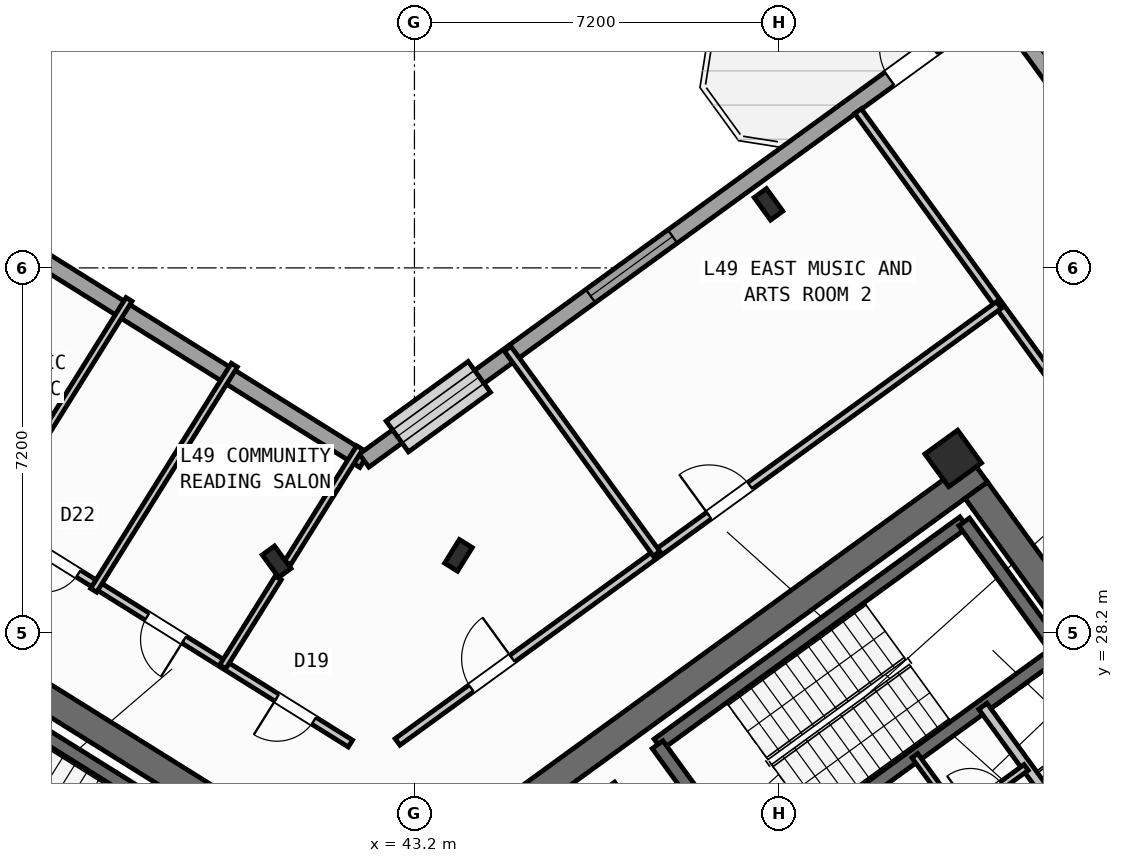
"""IFC4 building model, lengths in metres.
Left out: names, types, materials, properties, quantities, classifications, styles, units other than length and angle.
Written with IfcOpenShell. Run it as: python <this file> out.ifc"""

import sys

from ifc_helpers import new_model, si_unit, direction, frame, frame_2d, origin, origin_2d, place, context, subcontext, project, spatial, rectangle, hollow_rectangle, i_section, extrude, source, transform, mapped, element, fill, save


model = new_model("IFC4")
c1 = context("Model", 3, precision=1e-05, world=origin(), true_north=direction((0.0, 1.0)))
c2 = subcontext(c1, "Body", "Model", "MODEL_VIEW")
j1 = project(units=[si_unit("LENGTHUNIT", "METRE"), si_unit("PLANEANGLEUNIT", "RADIAN")], contexts=[c1])
p1 = place(None, origin())
s1 = spatial("IfcSite", under=j1, at=p1, CompositionType="ELEMENT")
p2 = place(p1, origin())
s2 = spatial("IfcBuilding", under=s1, at=p2, CompositionType="ELEMENT")
p3 = place(p2, frame((0.0, 0.0, 195.0)))
s3 = spatial("IfcBuildingStorey", under=s2, at=p3, CompositionType="ELEMENT", Elevation=195.0)
p4 = place(p3, frame((40.573, 24.01, 0.0), z_axis=(0.0, 0.0, 1.0), x_axis=(-0.848047359947, 0.529920442413, 0.0)))
e1 = element("IfcWall", 1, at=p4, inside=s3, PredefinedType="SHEAR", context=c2, shape_type="SweptSolid", body=[
    extrude(rectangle(XDim=13.14, YDim=0.55, at=frame_2d((6.57, 0.0))), origin(), (0.0, 0.0, 1.0), 4.22),
])
p5 = place(p3, frame((44.365, 24.142, 0.0), z_axis=(0.0, 0.0, 1.0), x_axis=(0.809024304885, 0.587775190107, 0.0)))
e2 = element("IfcWall", 2, at=p5, inside=s3, PredefinedType="SHEAR", context=c2, shape_type="SweptSolid", body=[
    extrude(rectangle(XDim=12.34, YDim=0.55, at=frame_2d((6.17, 0.0))), origin(), (0.0, 0.0, 1.0), 4.22),
])
p6 = place(p3, frame((58.064, 25.813, 0.0), z_axis=(0.0, 0.0, 1.0), x_axis=(-0.587764933797, 0.809031756236, 0.0)))
e3 = element("IfcWall", 3, at=p6, inside=s3, PredefinedType="SHEAR", context=c2, shape_type="SweptSolid", body=[
    extrude(rectangle(XDim=6.425, YDim=0.55, at=frame_2d((3.212, 0.0))), origin(), (0.0, 0.0, 1.0), 4.22),
])
m1 = source(origin(), c2, "Body", "SweptSolid", [
    extrude(i_section(OverallWidth=0.3, OverallDepth=0.55, WebThickness=0.015, FlangeThickness=0.029, at=origin_2d()), origin(), (0.0, 0.0, 1.0), 4.5),
])
for number, where, z_axis, x_axis in (
    (4, (44.068, 29.726, 0.0), (0.0, 0.0, 1.0), (-0.848, 0.53, 0.0)),
    (5, (40.479, 29.601, 0.0), (0.0, 0.0, 1.0), (0.809, 0.588, 0.0)),
):
    element("IfcColumn", number, at=place(p3, frame(where, z_axis=z_axis, x_axis=x_axis)), inside=s3, PredefinedType="COLUMN", context=c2, shape_type="MappedRepresentation", body=[
        mapped(m1, transform((0.0, 0.0, 0.0), scale=1.0)),
    ])
m2 = source(origin(), c2, "Body", "SweptSolid", [
    extrude(hollow_rectangle(XDim=0.8, YDim=0.8, WallThickness=0.032, at=origin_2d()), origin(), (0.0, 0.0, 1.0), 4.5),
])
p7 = place(p3, frame((53.832, 31.638, 0.0), z_axis=(0.0, 0.0, 1.0), x_axis=(0.809016994375, 0.587785252292, 0.0)))
e6 = element("IfcColumn", 6, at=p7, inside=s3, PredefinedType="COLUMN", context=c2, shape_type="MappedRepresentation", body=[
    mapped(m2, transform((0.0, 0.0, 0.0), scale=1.0)),
])
p8 = place(p3, frame((50.188, 36.654, 0.0), z_axis=(0.0, 0.0, 1.0), x_axis=(0.809016994375, 0.587785252292, 0.0)))
e7 = element("IfcColumn", 7, at=p8, inside=s3, PredefinedType="COLUMN", context=c2, shape_type="MappedRepresentation", body=[
    mapped(m1, transform((0.0, 0.0, 0.0), scale=1.0)),
])
p9 = place(p3, frame((17.424, 47.083, 0.0), z_axis=(0.0, 0.0, 1.0), x_axis=(0.848049927979, -0.529916332693, 0.0)))
e8 = element("IfcWall", 8, at=p9, inside=s3, PredefinedType="STANDARD", context=c2, shape_type="SweptSolid", body=[
    extrude(rectangle(XDim=29.223, YDim=0.32, at=frame_2d((14.612, 0.0))), origin(), (0.0, 0.0, 1.0), 4.22),
])
p10 = place(p9, frame((2.752, 0.0, 0.0)))
e9 = element("IfcOpeningElement", 9, at=p10, cuts=e8, PredefinedType="OPENING", context=c2, shape_type="SweptSolid", body=[
    extrude(rectangle(XDim=1.05, YDim=2.15, at=frame_2d((0.525, 1.075))), frame((0.0, 0.17, 0.0), z_axis=(0.0, -1.0, 0.0), x_axis=(1.0, 0.0, 0.0)), (0.0, 0.0, 1.0), 0.34),
])
p11 = place(p9, frame((0.641, 0.0, 0.85)))
e10 = element("IfcOpeningElement", 10, at=p11, cuts=e8, PredefinedType="OPENING", context=c2, shape_type="SweptSolid", body=[
    extrude(rectangle(XDim=1.6, YDim=1.8, at=frame_2d((0.8, 0.9))), frame((0.0, 0.17, 0.0), z_axis=(0.0, -1.0, 0.0), x_axis=(1.0, 0.0, 0.0)), (0.0, 0.0, 1.0), 0.34),
])
p12 = place(p9, frame((9.876, 0.0, 0.75)))
e11 = element("IfcOpeningElement", 11, at=p12, cuts=e8, PredefinedType="OPENING", context=c2, shape_type="SweptSolid", body=[
    extrude(rectangle(XDim=2.0, YDim=1.95, at=frame_2d((1.0, 0.975))), frame((0.0, 0.17, 0.0), z_axis=(0.0, -1.0, 0.0), x_axis=(1.0, 0.0, 0.0)), (0.0, 0.0, 1.0), 0.34),
])
p13 = place(p9, frame((13.674, 0.0, 0.85)))
e12 = element("IfcOpeningElement", 12, at=p13, cuts=e8, PredefinedType="OPENING", context=c2, shape_type="SweptSolid", body=[
    extrude(rectangle(XDim=1.6, YDim=1.8, at=frame_2d((0.8, 0.9))), frame((0.0, 0.17, 0.0), z_axis=(0.0, -1.0, 0.0), x_axis=(1.0, 0.0, 0.0)), (0.0, 0.0, 1.0), 0.34),
])
p14 = place(p3, frame((42.207, 31.597, 0.0), z_axis=(0.0, 0.0, 1.0), x_axis=(0.809020333377, 0.587780656523, 0.0)))
e13 = element("IfcWall", 13, at=p14, inside=s3, PredefinedType="STANDARD", context=c2, shape_type="SweptSolid", body=[
    extrude(rectangle(XDim=15.223, YDim=0.32, at=frame_2d((7.611, 0.0))), origin(), (0.0, 0.0, 1.0), 4.22),
])
p15 = place(p14, frame((12.82, 0.0, 0.0)))
e14 = element("IfcOpeningElement", 14, at=p15, cuts=e13, PredefinedType="OPENING", context=c2, shape_type="SweptSolid", body=[
    extrude(rectangle(XDim=1.05, YDim=2.15, at=frame_2d((0.525, 1.075))), frame((0.0, 0.17, 0.0), z_axis=(0.0, -1.0, 0.0), x_axis=(1.0, 0.0, 0.0)), (0.0, 0.0, 1.0), 0.34),
])
p16 = place(p14, frame((0.81, 0.0, 0.75)))
e15 = element("IfcOpeningElement", 15, at=p16, cuts=e13, PredefinedType="OPENING", context=c2, shape_type="SweptSolid", body=[
    extrude(rectangle(XDim=2.0, YDim=1.95, at=frame_2d((1.0, 0.975))), frame((0.0, 0.17, 0.0), z_axis=(0.0, -1.0, 0.0), x_axis=(1.0, 0.0, 0.0)), (0.0, 0.0, 1.0), 0.34),
])
p17 = place(p14, frame((5.524, 0.0, 0.75)))
e16 = element("IfcOpeningElement", 16, at=p17, cuts=e13, PredefinedType="OPENING", context=c2, shape_type="SweptSolid", body=[
    extrude(rectangle(XDim=2.0, YDim=1.95, at=frame_2d((1.0, 0.975))), frame((0.0, 0.17, 0.0), z_axis=(0.0, -1.0, 0.0), x_axis=(1.0, 0.0, 0.0)), (0.0, 0.0, 1.0), 0.34),
])
p18 = place(p3, frame((54.81, 40.5, 0.0), z_axis=(0.0, 0.0, 1.0), x_axis=(0.587783625747, -0.809018176127, 0.0)))
e17 = element("IfcWall", 17, at=p18, inside=s3, PredefinedType="STANDARD", context=c2, shape_type="SweptSolid", body=[
    extrude(rectangle(XDim=21.587, YDim=0.32, at=frame_2d((10.794, 0.0))), origin(), (0.0, 0.0, 1.0), 3.695),
])
p19 = place(p18, frame((2.131, 0.0, 0.7)))
e18 = element("IfcOpeningElement", 18, at=p19, cuts=e17, PredefinedType="OPENING", context=c2, shape_type="SweptSolid", body=[
    extrude(rectangle(XDim=2.6, YDim=2.0, at=frame_2d((1.3, 1.0))), frame((0.0, 0.17, 0.0), z_axis=(0.0, -1.0, 0.0), x_axis=(1.0, 0.0, 0.0)), (0.0, 0.0, 1.0), 0.34),
])
p20 = place(p18, frame((9.244, 0.0, 0.75)))
e19 = element("IfcOpeningElement", 19, at=p20, cuts=e17, PredefinedType="OPENING", context=c2, shape_type="SweptSolid", body=[
    extrude(rectangle(XDim=2.0, YDim=1.95, at=frame_2d((1.0, 0.975))), frame((0.0, 0.17, 0.0), z_axis=(0.0, -1.0, 0.0), x_axis=(1.0, 0.0, 0.0)), (0.0, 0.0, 1.0), 0.34),
])
p21 = place(p18, frame((15.294, 0.0, 0.85)))
e20 = element("IfcOpeningElement", 20, at=p21, cuts=e17, PredefinedType="OPENING", context=c2, shape_type="SweptSolid", body=[
    extrude(rectangle(XDim=1.6, YDim=1.8, at=frame_2d((0.8, 0.9))), frame((0.0, 0.17, 0.0), z_axis=(0.0, -1.0, 0.0), x_axis=(1.0, 0.0, 0.0)), (0.0, 0.0, 1.0), 0.34),
])
p22 = place(p18, frame((18.194, 0.0, 0.85)))
e21 = element("IfcOpeningElement", 21, at=p22, cuts=e17, PredefinedType="OPENING", context=c2, shape_type="SweptSolid", body=[
    extrude(rectangle(XDim=1.6, YDim=1.8, at=frame_2d((0.8, 0.9))), frame((0.0, 0.17, 0.0), z_axis=(0.0, -1.0, 0.0), x_axis=(1.0, 0.0, 0.0)), (0.0, 0.0, 1.0), 0.34),
])
p23 = place(p3, frame((39.721, 23.788, 0.0), z_axis=(0.0, 0.0, 1.0), x_axis=(-0.848054434086, 0.529909121291, 0.0)))
e22 = element("IfcWall", 22, at=p23, inside=s3, PredefinedType="SHEAR", context=c2, shape_type="SweptSolid", body=[
    extrude(rectangle(XDim=7.33, YDim=0.26, at=frame_2d((3.665, 0.0))), origin(), (0.0, 0.0, 1.0), 4.22),
])
p24 = place(p3, frame((48.006, 25.996, 0.0), z_axis=(0.0, 0.0, 1.0), x_axis=(0.80901903764, 0.587782439969, 0.0)))
e23 = element("IfcWall", 23, at=p24, inside=s3, PredefinedType="SHEAR", context=c2, shape_type="SweptSolid", body=[
    extrude(rectangle(XDim=7.46, YDim=0.26, at=frame_2d((3.73, 0.0))), origin(), (0.0, 0.0, 1.0), 4.22),
])
p25 = place(p3, frame((49.863, 23.44, 0.0), z_axis=(0.0, 0.0, 1.0), x_axis=(0.809003474932, 0.587803859759, 0.0)))
e24 = element("IfcWall", 24, at=p25, inside=s3, PredefinedType="SHEAR", context=c2, shape_type="SweptSolid", body=[
    extrude(rectangle(XDim=7.46, YDim=0.26, at=frame_2d((3.73, 0.0))), origin(), (0.0, 0.0, 1.0), 4.22),
])
p26 = place(p25, frame((0.36, 0.0, 0.0)))
e25 = element("IfcOpeningElement", 25, at=p26, cuts=e24, PredefinedType="OPENING", context=c2, shape_type="SweptSolid", body=[
    extrude(rectangle(XDim=0.86, YDim=2.05, at=frame_2d((0.43, 1.025))), frame((0.0, 0.14, 0.0), z_axis=(0.0, -1.0, 0.0), x_axis=(1.0, 0.0, 0.0)), (0.0, 0.0, 1.0), 0.28),
])
p27 = place(p3, frame((49.855, 23.434, 0.0), z_axis=(0.0, 0.0, 1.0), x_axis=(-0.58776738483, 0.809029975545, 0.0)))
e26 = element("IfcWall", 26, at=p27, inside=s3, PredefinedType="SHEAR", context=c2, shape_type="SweptSolid", body=[
    extrude(rectangle(XDim=3.16, YDim=0.26, at=frame_2d((1.58, 0.0))), origin(), (0.0, 0.0, 1.0), 4.22),
])
p28 = place(p3, frame((55.906, 27.831, 0.0), z_axis=(0.0, 0.0, 1.0), x_axis=(-0.587804123638, 0.809003283204, 0.0)))
e27 = element("IfcWall", 27, at=p28, inside=s3, PredefinedType="SHEAR", context=c2, shape_type="SweptSolid", body=[
    extrude(rectangle(XDim=3.16, YDim=0.26, at=frame_2d((1.58, 0.0))), origin(), (0.0, 0.0, 1.0), 4.22),
])
p29 = place(p3, frame((48.786, 22.83, 0.0), z_axis=(0.0, 0.0, 1.0), x_axis=(-0.587783856777, 0.809018008275, 0.0)))
e28 = element("IfcWall", 28, at=p29, inside=s3, PredefinedType="STANDARD", context=c2, shape_type="SweptSolid", body=[
    extrude(rectangle(XDim=2.92, YDim=0.2, at=frame_2d((1.46, 0.0))), origin(), (0.0, 0.0, 1.0), 4.21),
])
p30 = place(p3, frame((56.111, 24.419, 0.0), z_axis=(0.0, 0.0, 1.0), x_axis=(-0.58777848983, 0.809021907548, 0.0)))
e29 = element("IfcWall", 29, at=p30, inside=s3, PredefinedType="STANDARD", context=c2, shape_type="SweptSolid", body=[
    extrude(rectangle(XDim=2.88, YDim=0.2, at=frame_2d((1.44, 0.0))), origin(), (0.0, 0.0, 1.0), 4.21),
])
p31 = place(p3, frame((53.425, 22.468, 0.0), z_axis=(0.0, 0.0, 1.0), x_axis=(0.809024377198, 0.587775090574, 0.0)))
e30 = element("IfcWall", 30, at=p31, inside=s3, PredefinedType="STANDARD", context=c2, shape_type="SweptSolid", body=[
    extrude(rectangle(XDim=5.418, YDim=0.2, at=frame_2d((2.709, 0.0))), origin(), (0.0, 0.0, 1.0), 4.21),
])
p32 = place(p31, frame((4.28, 0.0, 0.0)))
e31 = element("IfcOpeningElement", 31, at=p32, cuts=e30, PredefinedType="OPENING", context=c2, shape_type="SweptSolid", body=[
    extrude(rectangle(XDim=0.86, YDim=2.05, at=frame_2d((0.43, 1.025))), frame((0.0, 0.11, 0.0), z_axis=(0.0, -1.0, 0.0), x_axis=(1.0, 0.0, 0.0)), (0.0, 0.0, 1.0), 0.22),
])
p33 = place(p31, frame((0.35, 0.0, 0.0)))
e32 = element("IfcOpeningElement", 32, at=p33, cuts=e30, PredefinedType="OPENING", context=c2, shape_type="SweptSolid", body=[
    extrude(rectangle(XDim=0.86, YDim=2.05, at=frame_2d((0.43, 1.025))), frame((0.0, 0.11, 0.0), z_axis=(0.0, -1.0, 0.0), x_axis=(1.0, 0.0, 0.0)), (0.0, 0.0, 1.0), 0.22),
])
p34 = place(p3, frame((53.945, 24.576, 0.0), z_axis=(0.0, 0.0, 1.0), x_axis=(-0.587897037186, 0.808935766095, 0.0)))
e33 = element("IfcWall", 33, at=p34, inside=s3, PredefinedType="PLUMBINGWALL", context=c2, shape_type="SweptSolid", body=[
    extrude(rectangle(XDim=1.48, YDim=0.14, at=frame_2d((0.74, 0.0))), origin(), (0.0, 0.0, 1.0), 4.21),
])
p35 = place(p3, frame((52.618, 23.612, 0.0), z_axis=(0.0, 0.0, 1.0), x_axis=(0.809009587469, 0.587795446889, 0.0)))
e34 = element("IfcWall", 34, at=p35, inside=s3, PredefinedType="PLUMBINGWALL", context=c2, shape_type="SweptSolid", body=[
    extrude(rectangle(XDim=3.28, YDim=0.14, at=frame_2d((1.64, 0.0))), origin(), (0.0, 0.0, 1.0), 4.21),
])
p36 = place(p35, frame((0.25, 0.0, 0.0)))
e35 = element("IfcOpeningElement", 35, at=p36, cuts=e34, PredefinedType="OPENING", context=c2, shape_type="SweptSolid", body=[
    extrude(rectangle(XDim=0.78, YDim=2.05, at=frame_2d((0.39, 1.025))), frame((0.0, 0.08, 0.0), z_axis=(0.0, -1.0, 0.0), x_axis=(1.0, 0.0, 0.0)), (0.0, 0.0, 1.0), 0.16),
])
p37 = place(p35, frame((1.92, 0.0, 0.0)))
e36 = element("IfcOpeningElement", 36, at=p37, cuts=e34, PredefinedType="OPENING", context=c2, shape_type="SweptSolid", body=[
    extrude(rectangle(XDim=0.78, YDim=2.05, at=frame_2d((0.39, 1.025))), frame((0.0, 0.08, 0.0), z_axis=(0.0, -1.0, 0.0), x_axis=(1.0, 0.0, 0.0)), (0.0, 0.0, 1.0), 0.16),
])
p38 = place(p3, frame((41.936, 26.012, 0.0), z_axis=(0.0, 0.0, 1.0), x_axis=(-0.848051154596, 0.529914369676, 0.0)))
e37 = element("IfcWall", 37, at=p38, inside=s3, PredefinedType="PARTITIONING", context=c2, shape_type="SweptSolid", body=[
    extrude(rectangle(XDim=15.57, YDim=0.16, at=frame_2d((7.785, 0.0))), origin(), (0.0, 0.0, 1.0), 4.21),
])
p39 = place(p38, frame((0.85, 0.0, 0.0)))
e38 = element("IfcOpeningElement", 38, at=p39, cuts=e37, PredefinedType="OPENING", context=c2, shape_type="SweptSolid", body=[
    extrude(rectangle(XDim=0.86, YDim=2.05, at=frame_2d((0.43, 1.025))), frame((0.0, 0.09, 0.0), z_axis=(0.0, -1.0, 0.0), x_axis=(1.0, 0.0, 0.0)), (0.0, 0.0, 1.0), 0.18),
])
p40 = place(p38, frame((3.87, 0.0, 0.0)))
e39 = element("IfcOpeningElement", 39, at=p40, cuts=e37, PredefinedType="OPENING", context=c2, shape_type="SweptSolid", body=[
    extrude(rectangle(XDim=0.86, YDim=2.05, at=frame_2d((0.43, 1.025))), frame((0.0, 0.09, 0.0), z_axis=(0.0, -1.0, 0.0), x_axis=(1.0, 0.0, 0.0)), (0.0, 0.0, 1.0), 0.18),
])
p41 = place(p38, frame((6.33, 0.0, 0.0)))
e40 = element("IfcOpeningElement", 40, at=p41, cuts=e37, PredefinedType="OPENING", context=c2, shape_type="SweptSolid", body=[
    extrude(rectangle(XDim=0.78, YDim=2.05, at=frame_2d((0.39, 1.025))), frame((0.0, 0.09, 0.0), z_axis=(0.0, -1.0, 0.0), x_axis=(1.0, 0.0, 0.0)), (0.0, 0.0, 1.0), 0.18),
])
p42 = place(p38, frame((8.78, 0.0, 0.0)))
e41 = element("IfcOpeningElement", 41, at=p42, cuts=e37, PredefinedType="OPENING", context=c2, shape_type="SweptSolid", body=[
    extrude(rectangle(XDim=0.78, YDim=2.05, at=frame_2d((0.39, 1.025))), frame((0.0, 0.09, 0.0), z_axis=(0.0, -1.0, 0.0), x_axis=(1.0, 0.0, 0.0)), (0.0, 0.0, 1.0), 0.18),
])
p43 = place(p38, frame((11.18, 0.0, 0.0)))
e42 = element("IfcOpeningElement", 42, at=p43, cuts=e37, PredefinedType="OPENING", context=c2, shape_type="SweptSolid", body=[
    extrude(rectangle(XDim=0.78, YDim=2.05, at=frame_2d((0.39, 1.025))), frame((0.0, 0.09, 0.0), z_axis=(0.0, -1.0, 0.0), x_axis=(1.0, 0.0, 0.0)), (0.0, 0.0, 1.0), 0.18),
])
p44 = place(p3, frame((42.119, 31.853, 0.0), z_axis=(0.0, 0.0, 1.0), x_axis=(-0.529933506458, -0.848039196461, 0.0)))
e43 = element("IfcWall", 43, at=p44, inside=s3, PredefinedType="PLUMBINGWALL", context=c2, shape_type="SweptSolid", body=[
    extrude(rectangle(XDim=2.683, YDim=0.14, at=frame_2d((1.342, 0.0))), origin(), (0.0, 0.0, 1.0), 3.805),
])
p45 = place(p3, frame((40.512, 29.281, 0.0), z_axis=(0.0, 0.0, 1.0), x_axis=(-0.529935255849, -0.848038103276, 0.0)))
e44 = element("IfcWall", 44, at=p45, inside=s3, PredefinedType="PLUMBINGWALL", context=c2, shape_type="SweptSolid", body=[
    extrude(rectangle(XDim=2.068, YDim=0.14, at=frame_2d((1.034, 0.0))), origin(), (0.0, 0.0, 1.0), 4.21),
])
for number, where, z_axis, x_axis in (
    (45, (39.646, 33.48, 0.0), (0.0, 0.0, 1.0), (-0.53, -0.848, 0.0)),
    (46, (37.568, 34.779, 0.0), (0.0, 0.0, 1.0), (-0.53, -0.848, 0.0)),
):
    element("IfcWall", number, at=place(p3, frame(where, z_axis=z_axis, x_axis=x_axis)), inside=s3, PredefinedType="PLUMBINGWALL", context=c2, shape_type="SweptSolid", body=[
        extrude(rectangle(XDim=5.24, YDim=0.14, at=frame_2d((2.62, 0.0))), origin(), (0.0, 0.0, 1.0), 4.21),
    ])
p46 = place(p3, frame((64.709, 20.938, 0.0), z_axis=(0.0, 0.0, 1.0), x_axis=(-0.58777828151, 0.809022058899, 0.0)))
e47 = element("IfcWall", 47, at=p46, inside=s3, PredefinedType="PARTITIONING", context=c2, shape_type="SweptSolid", body=[
    extrude(rectangle(XDim=21.7, YDim=0.16, at=frame_2d((10.85, 0.0))), origin(), (0.0, 0.0, 1.0), 4.21),
])
p47 = place(p46, frame((5.12, 0.0, 0.0)))
e48 = element("IfcOpeningElement", 48, at=p47, cuts=e47, PredefinedType="OPENING", context=c2, shape_type="SweptSolid", body=[
    extrude(rectangle(XDim=1.7, YDim=2.2, at=frame_2d((0.85, 1.1))), frame((0.0, 0.09, 0.0), z_axis=(0.0, -1.0, 0.0), x_axis=(1.0, 0.0, 0.0)), (0.0, 0.0, 1.0), 0.18),
])
p48 = place(p3, frame((42.866, 26.044, 0.0), z_axis=(0.0, 0.0, 1.0), x_axis=(0.809020254154, 0.587780765566, 0.0)))
e49 = element("IfcWall", 49, at=p48, inside=s3, PredefinedType="PARTITIONING", context=c2, shape_type="SweptSolid", body=[
    extrude(rectangle(XDim=14.67, YDim=0.16, at=frame_2d((7.335, 0.0))), origin(), (0.0, 0.0, 1.0), 4.21),
])
p49 = place(p48, frame((1.8, 0.0, 0.0)))
e50 = element("IfcOpeningElement", 50, at=p49, cuts=e49, PredefinedType="OPENING", context=c2, shape_type="SweptSolid", body=[
    extrude(rectangle(XDim=1.0, YDim=2.1, at=frame_2d((0.5, 1.05))), frame((0.0, 0.09, 0.0), z_axis=(0.0, -1.0, 0.0), x_axis=(1.0, 0.0, 0.0)), (0.0, 0.0, 1.0), 0.18),
])
p50 = place(p48, frame((7.6, 0.0, 0.0)))
e51 = element("IfcOpeningElement", 51, at=p50, cuts=e49, PredefinedType="OPENING", context=c2, shape_type="SweptSolid", body=[
    extrude(rectangle(XDim=1.0, YDim=2.1, at=frame_2d((0.5, 1.05))), frame((0.0, 0.09, 0.0), z_axis=(0.0, -1.0, 0.0), x_axis=(1.0, 0.0, 0.0)), (0.0, 0.0, 1.0), 0.18),
])
p51 = place(p3, frame((47.979, 29.759, 0.0), z_axis=(0.0, 0.0, 1.0), x_axis=(-0.587782595105, 0.809018924928, 0.0)))
e52 = element("IfcWall", 52, at=p51, inside=s3, PredefinedType="PARTITIONING", context=c2, shape_type="SweptSolid", body=[
    extrude(rectangle(XDim=5.0, YDim=0.16, at=frame_2d((2.5, 0.0))), origin(), (0.0, 0.0, 1.0), 4.21),
])
m3 = source(origin(), c2, "Body", "SweptSolid", [
    extrude(rectangle(XDim=1.05, YDim=2.15, at=frame_2d((0.525, 1.075))), frame((0.0, 0.025, 0.0), z_axis=(0.0, -1.0, 0.0), x_axis=(1.0, 0.0, 0.0)), (0.0, 0.0, 1.0), 0.05),
])
p52 = place(p15, origin())
e53 = element("IfcDoor", 53, at=p52, inside=s3, OperationType="SINGLE_SWING_RIGHT", PredefinedType="DOOR", context=c2, shape_type="MappedRepresentation", body=[
    mapped(m3, transform((0.0, 0.0, 0.0), scale=1.0)),
])
fill(e14, e53)
m4 = source(origin(), c2, "Body", "SweptSolid", [
    extrude(rectangle(XDim=2.0, YDim=1.95, at=frame_2d((1.0, 0.975))), frame((0.0, 0.03, 0.0), z_axis=(0.0, -1.0, 0.0), x_axis=(1.0, 0.0, 0.0)), (0.0, 0.0, 1.0), 0.06),
])
p53 = place(p16, origin())
e54 = element("IfcWindow", 54, at=p53, inside=s3, PartitioningType="SINGLE_PANEL", PredefinedType="WINDOW", context=c2, shape_type="MappedRepresentation", body=[
    mapped(m4, transform((0.0, 0.0, 0.0), scale=1.0)),
])
fill(e15, e54)
p54 = place(p17, origin())
e55 = element("IfcWindow", 55, at=p54, inside=s3, PartitioningType="SINGLE_PANEL", PredefinedType="WINDOW", context=c2, shape_type="MappedRepresentation", body=[
    mapped(m4, transform((0.0, 0.0, 0.0), scale=1.0)),
])
fill(e16, e55)
m5 = source(origin(), c2, "Body", "SweptSolid", [
    extrude(rectangle(XDim=0.86, YDim=2.05, at=frame_2d((0.43, 1.025))), frame((0.0, 0.025, 0.0), z_axis=(0.0, -1.0, 0.0), x_axis=(1.0, 0.0, 0.0)), (0.0, 0.0, 1.0), 0.05),
])
p55 = place(p39, origin())
e56 = element("IfcDoor", 56, at=p55, inside=s3, OperationType="SINGLE_SWING_RIGHT", PredefinedType="DOOR", context=c2, shape_type="MappedRepresentation", body=[
    mapped(m5, transform((0.0, 0.0, 0.0), scale=1.0)),
])
fill(e38, e56)
p56 = place(p40, origin())
e57 = element("IfcDoor", 57, at=p56, inside=s3, OperationType="SINGLE_SWING_LEFT", PredefinedType="DOOR", context=c2, shape_type="MappedRepresentation", body=[
    mapped(m5, transform((0.0, 0.0, 0.0), scale=1.0)),
])
fill(e39, e57)
m6 = source(origin(), c2, "Body", "SweptSolid", [
    extrude(rectangle(XDim=0.78, YDim=2.05, at=frame_2d((0.39, 1.025))), frame((0.0, 0.025, 0.0), z_axis=(0.0, -1.0, 0.0), x_axis=(1.0, 0.0, 0.0)), (0.0, 0.0, 1.0), 0.05),
])
p57 = place(p41, origin())
e58 = element("IfcDoor", 58, at=p57, inside=s3, OperationType="SINGLE_SWING_RIGHT", PredefinedType="DOOR", context=c2, shape_type="MappedRepresentation", body=[
    mapped(m6, transform((0.0, 0.0, 0.0), scale=1.0)),
])
fill(e40, e58)
m7 = source(origin(), c2, "Body", "SweptSolid", [
    extrude(rectangle(XDim=1.0, YDim=2.1, at=frame_2d((0.5, 1.05))), frame((0.0, 0.025, 0.0), z_axis=(0.0, -1.0, 0.0), x_axis=(1.0, 0.0, 0.0)), (0.0, 0.0, 1.0), 0.05),
])
p58 = place(p49, origin())
e59 = element("IfcDoor", 59, at=p58, inside=s3, OperationType="SINGLE_SWING_RIGHT", PredefinedType="DOOR", context=c2, shape_type="MappedRepresentation", body=[
    mapped(m7, transform((0.0, 0.0, 0.0), scale=1.0)),
])
fill(e50, e59)
p59 = place(p50, origin())
e60 = element("IfcDoor", 60, at=p59, inside=s3, OperationType="SINGLE_SWING_LEFT", PredefinedType="DOOR", context=c2, shape_type="MappedRepresentation", body=[
    mapped(m7, transform((0.0, 0.0, 0.0), scale=1.0)),
])
fill(e51, e60)
save(model, sys.argv[1])
